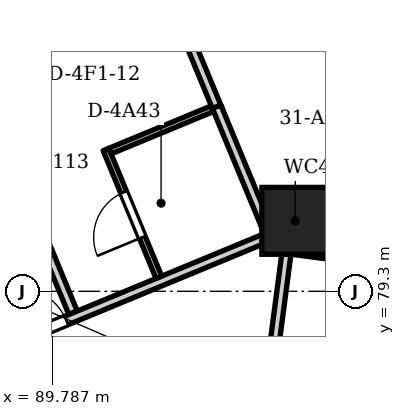
"""IFC4 building model, lengths in metres.
Left out: names, types, materials, properties, quantities, classifications, styles, units other than length and angle.
Written with IfcOpenShell. Run it as: python <this file> out.ifc"""

import sys

from ifc_helpers import new_model, si_unit, direction, frame, frame_2d, origin, origin_2d, place, context, subcontext, project, spatial, polyline, rectangle, circle, outline, extrude, element, fill, save


model = new_model("IFC4")
c1 = context("Model", 3, precision=1e-05, world=origin(), true_north=direction((0.0, 1.0)))
c2 = subcontext(c1, "Body", "Model", "MODEL_VIEW")
j1 = project(units=[si_unit("LENGTHUNIT", "METRE"), si_unit("PLANEANGLEUNIT", "RADIAN")], contexts=[c1])
p1 = place(None, origin())
s1 = spatial("IfcSite", under=j1, at=p1, CompositionType="ELEMENT")
p2 = place(p1, origin())
s2 = spatial("IfcBuilding", under=s1, at=p2, CompositionType="ELEMENT")
p3 = place(p2, frame((0.0, 0.0, 124.2)))
s3 = spatial("IfcBuildingStorey", under=s2, at=p3, CompositionType="ELEMENT", Elevation=124.2)
p4 = place(p3, frame((93.78, 80.459, -0.35), z_axis=(0.0, 0.0, 1.0), x_axis=(1.0, 0.0, 0.0)))
e1 = element("IfcColumn", 1, at=p4, inside=s3, PredefinedType="COLUMN", context=c2, shape_type="SweptSolid", body=[
    extrude(circle(Radius=0.55, at=origin_2d()), origin(), (0.0, 0.0, 1.0), 3.95),
])
p5 = place(p3, frame((52.387, 70.1, 0.0), z_axis=(0.0, 0.0, 1.0), x_axis=(0.92388051416, 0.382681062447, 0.0)))
e2 = element("IfcWall", 2, at=p5, inside=s3, PredefinedType="SOLIDWALL", context=c2, shape_type="SweptSolid", body=[
    extrude(outline(polyline([(0.149, 0.075), (0.149, -0.075), (45.057, -0.075), (45.057, 0.075), (0.149, 0.075)])), origin(), (0.0, 0.0, 1.0), 3.3),
])
p6 = place(p5, frame((1.239, 0.0, 0.0)))
e3 = element("IfcOpeningElement", 3, at=p6, cuts=e2, PredefinedType="OPENING", context=c2, shape_type="SweptSolid", body=[
    extrude(rectangle(XDim=1.8, YDim=2.6, at=frame_2d((0.9, 1.3))), frame((0.0, 0.085, 0.0), z_axis=(0.0, -1.0, 0.0), x_axis=(1.0, 0.0, 0.0)), (0.0, 0.0, 1.0), 0.17),
])
p7 = place(p5, frame((4.316, 0.0, 0.0)))
e4 = element("IfcOpeningElement", 4, at=p7, cuts=e2, PredefinedType="OPENING", context=c2, shape_type="SweptSolid", body=[
    extrude(rectangle(XDim=1.8, YDim=2.6, at=frame_2d((0.9, 1.3))), frame((0.0, 0.085, 0.0), z_axis=(0.0, -1.0, 0.0), x_axis=(1.0, 0.0, 0.0)), (0.0, 0.0, 1.0), 0.17),
])
p8 = place(p5, frame((7.793, 0.0, 0.0)))
e5 = element("IfcOpeningElement", 5, at=p8, cuts=e2, PredefinedType="OPENING", context=c2, shape_type="SweptSolid", body=[
    extrude(rectangle(XDim=1.8, YDim=2.6, at=frame_2d((0.9, 1.3))), frame((0.0, 0.085, 0.0), z_axis=(0.0, -1.0, 0.0), x_axis=(1.0, 0.0, 0.0)), (0.0, 0.0, 1.0), 0.17),
])
p9 = place(p5, frame((11.271, 0.0, 0.0)))
e6 = element("IfcOpeningElement", 6, at=p9, cuts=e2, PredefinedType="OPENING", context=c2, shape_type="SweptSolid", body=[
    extrude(rectangle(XDim=1.8, YDim=2.6, at=frame_2d((0.9, 1.3))), frame((0.0, 0.085, 0.0), z_axis=(0.0, -1.0, 0.0), x_axis=(1.0, 0.0, 0.0)), (0.0, 0.0, 1.0), 0.17),
])
p10 = place(p5, frame((14.748, 0.0, 0.0)))
e7 = element("IfcOpeningElement", 7, at=p10, cuts=e2, PredefinedType="OPENING", context=c2, shape_type="SweptSolid", body=[
    extrude(rectangle(XDim=1.8, YDim=2.6, at=frame_2d((0.9, 1.3))), frame((0.0, 0.085, 0.0), z_axis=(0.0, -1.0, 0.0), x_axis=(1.0, 0.0, 0.0)), (0.0, 0.0, 1.0), 0.17),
])
p11 = place(p5, frame((18.226, 0.0, 0.0)))
e8 = element("IfcOpeningElement", 8, at=p11, cuts=e2, PredefinedType="OPENING", context=c2, shape_type="SweptSolid", body=[
    extrude(rectangle(XDim=1.8, YDim=2.6, at=frame_2d((0.9, 1.3))), frame((0.0, 0.085, 0.0), z_axis=(0.0, -1.0, 0.0), x_axis=(1.0, 0.0, 0.0)), (0.0, 0.0, 1.0), 0.17),
])
p12 = place(p5, frame((21.703, 0.0, 0.0)))
e9 = element("IfcOpeningElement", 9, at=p12, cuts=e2, PredefinedType="OPENING", context=c2, shape_type="SweptSolid", body=[
    extrude(rectangle(XDim=1.8, YDim=2.6, at=frame_2d((0.9, 1.3))), frame((0.0, 0.085, 0.0), z_axis=(0.0, -1.0, 0.0), x_axis=(1.0, 0.0, 0.0)), (0.0, 0.0, 1.0), 0.17),
])
p13 = place(p5, frame((25.18, 0.0, 0.0)))
e10 = element("IfcOpeningElement", 10, at=p13, cuts=e2, PredefinedType="OPENING", context=c2, shape_type="SweptSolid", body=[
    extrude(rectangle(XDim=1.8, YDim=2.6, at=frame_2d((0.9, 1.3))), frame((0.0, 0.085, 0.0), z_axis=(0.0, -1.0, 0.0), x_axis=(1.0, 0.0, 0.0)), (0.0, 0.0, 1.0), 0.17),
])
p14 = place(p5, frame((28.658, 0.0, 0.0)))
e11 = element("IfcOpeningElement", 11, at=p14, cuts=e2, PredefinedType="OPENING", context=c2, shape_type="SweptSolid", body=[
    extrude(rectangle(XDim=1.8, YDim=2.6, at=frame_2d((0.9, 1.3))), frame((0.0, 0.085, 0.0), z_axis=(0.0, -1.0, 0.0), x_axis=(1.0, 0.0, 0.0)), (0.0, 0.0, 1.0), 0.17),
])
p15 = place(p5, frame((32.135, 0.0, 0.0)))
e12 = element("IfcOpeningElement", 12, at=p15, cuts=e2, PredefinedType="OPENING", context=c2, shape_type="SweptSolid", body=[
    extrude(rectangle(XDim=1.8, YDim=2.6, at=frame_2d((0.9, 1.3))), frame((0.0, 0.085, 0.0), z_axis=(0.0, -1.0, 0.0), x_axis=(1.0, 0.0, 0.0)), (0.0, 0.0, 1.0), 0.17),
])
p16 = place(p5, frame((35.613, 0.0, 0.0)))
e13 = element("IfcOpeningElement", 13, at=p16, cuts=e2, PredefinedType="OPENING", context=c2, shape_type="SweptSolid", body=[
    extrude(rectangle(XDim=1.8, YDim=2.6, at=frame_2d((0.9, 1.3))), frame((0.0, 0.085, 0.0), z_axis=(0.0, -1.0, 0.0), x_axis=(1.0, 0.0, 0.0)), (0.0, 0.0, 1.0), 0.17),
])
p17 = place(p5, frame((39.09, 0.0, 0.0)))
e14 = element("IfcOpeningElement", 14, at=p17, cuts=e2, PredefinedType="OPENING", context=c2, shape_type="SweptSolid", body=[
    extrude(rectangle(XDim=1.8, YDim=2.6, at=frame_2d((0.9, 1.3))), frame((0.0, 0.085, 0.0), z_axis=(0.0, -1.0, 0.0), x_axis=(1.0, 0.0, 0.0)), (0.0, 0.0, 1.0), 0.17),
])
p18 = place(p5, frame((42.167, 0.0, 0.0)))
e15 = element("IfcOpeningElement", 15, at=p18, cuts=e2, PredefinedType="OPENING", context=c2, shape_type="SweptSolid", body=[
    extrude(rectangle(XDim=1.8, YDim=2.6, at=frame_2d((0.9, 1.3))), frame((0.0, 0.085, 0.0), z_axis=(0.0, -1.0, 0.0), x_axis=(1.0, 0.0, 0.0)), (0.0, 0.0, 1.0), 0.17),
])
p19 = place(p3, frame((87.755, 84.668, 0.0), z_axis=(0.0, 0.0, 1.0), x_axis=(0.382666303598, -0.923886627293, 0.0)))
e16 = element("IfcWall", 16, at=p19, inside=s3, PredefinedType="PARTITIONING", context=c2, shape_type="SweptSolid", body=[
    extrude(rectangle(XDim=6.193, YDim=0.15, at=frame_2d((3.097, 0.0))), origin(), (0.0, 0.0, 1.0), 3.3),
])
p20 = place(p3, frame((88.693, 78.272, 0.0), z_axis=(0.0, 0.0, 1.0), x_axis=(0.92395946552, 0.382490399978, 0.0)))
e17 = element("IfcWall", 17, at=p20, inside=s3, PredefinedType="PARTITIONING", context=c2, shape_type="SweptSolid", body=[
    extrude(rectangle(XDim=5.134, YDim=0.15, at=frame_2d((2.567, 0.0))), origin(), (0.0, 0.0, 1.0), 2.8),
])
p21 = place(p20, frame((0.531, 0.0, 0.0)))
e18 = element("IfcOpeningElement", 18, at=p21, cuts=e17, PredefinedType="OPENING", context=c2, shape_type="SweptSolid", body=[
    extrude(rectangle(XDim=0.9, YDim=2.1, at=frame_2d((0.45, 1.05))), frame((0.0, 0.085, 0.0), z_axis=(0.0, -1.0, 0.0), x_axis=(1.0, 0.0, 0.0)), (0.0, 0.0, 1.0), 0.17),
])
p22 = place(p3, frame((90.666, 81.632, 0.0), z_axis=(0.0, 0.0, 1.0), x_axis=(0.382595073996, -0.923916126796, 0.0)))
e19 = element("IfcWall", 19, at=p22, inside=s3, PredefinedType="PARTITIONING", context=c2, shape_type="SweptSolid", body=[
    extrude(rectangle(XDim=2.275, YDim=0.1, at=frame_2d((1.137, 0.0))), origin(), (0.0, 0.0, 1.0), 3.3),
])
p23 = place(p22, frame((0.763, 0.0, 0.0)))
e20 = element("IfcOpeningElement", 20, at=p23, cuts=e19, PredefinedType="OPENING", context=c2, shape_type="SweptSolid", body=[
    extrude(rectangle(XDim=0.8, YDim=2.1, at=frame_2d((0.4, 1.05))), frame((0.0, 0.06, 0.0), z_axis=(0.0, -1.0, 0.0), x_axis=(1.0, 0.0, 0.0)), (0.0, 0.0, 1.0), 0.12),
])
p24 = place(p3, frame((90.731, 81.605, 0.0), z_axis=(0.0, 0.0, 1.0), x_axis=(0.923945120737, 0.382525049986, 0.0)))
e21 = element("IfcWall", 21, at=p24, inside=s3, PredefinedType="PARTITIONING", context=c2, shape_type="SweptSolid", body=[
    extrude(rectangle(XDim=1.825, YDim=0.1, at=frame_2d((0.913, 0.0))), origin(), (0.0, 0.0, 1.0), 3.3),
])
p25 = place(p3, frame((90.968, 85.999, 0.0), z_axis=(0.0, 0.0, 1.0), x_axis=(0.382692977479, -0.923875578738, 0.0)))
e22 = element("IfcWall", 22, at=p25, inside=s3, PredefinedType="PARTITIONING", context=c2, shape_type="SweptSolid", body=[
    extrude(rectangle(XDim=4.024, YDim=0.15, at=frame_2d((2.012, 0.0))), origin(), (0.0, 0.0, 1.0), 3.3),
])
p26 = place(p25, frame((0.15, 0.0, 0.0)))
e23 = element("IfcOpeningElement", 23, at=p26, cuts=e22, PredefinedType="OPENING", context=c2, shape_type="SweptSolid", body=[
    extrude(rectangle(XDim=0.9, YDim=2.1, at=frame_2d((0.45, 1.05))), frame((0.0, 0.085, 0.0), z_axis=(0.0, -1.0, 0.0), x_axis=(1.0, 0.0, 0.0)), (0.0, 0.0, 1.0), 0.17),
])
p27 = place(p3, frame((92.486, 82.336, 0.0), z_axis=(0.0, 0.0, 1.0), x_axis=(0.382374366103, -0.924007491391, 0.0)))
e24 = element("IfcWall", 24, at=p27, inside=s3, PredefinedType="PARTITIONING", context=c2, shape_type="SweptSolid", body=[
    extrude(rectangle(XDim=2.229, YDim=0.15, at=frame_2d((1.115, 0.0))), origin(), (0.0, 0.0, 1.0), 3.3),
])
p28 = place(p3, frame((92.983, 74.979, 0.0), z_axis=(0.0, 0.0, 1.0), x_axis=(0.130587368937, 0.991436805386, 0.0)))
e25 = element("IfcWall", 25, at=p28, inside=s3, PredefinedType="PARTITIONING", context=c2, shape_type="SweptSolid", body=[
    extrude(rectangle(XDim=5.134, YDim=0.15, at=frame_2d((2.567, 0.0))), origin(), (0.0, 0.0, 1.0), 2.8),
])
p29 = place(p28, frame((0.532, 0.0, 0.0)))
e26 = element("IfcOpeningElement", 26, at=p29, cuts=e25, PredefinedType="OPENING", context=c2, shape_type="SweptSolid", body=[
    extrude(rectangle(XDim=0.9, YDim=2.1, at=frame_2d((0.45, 1.05))), frame((0.0, 0.085, 0.0), z_axis=(0.0, -1.0, 0.0), x_axis=(1.0, 0.0, 0.0)), (0.0, 0.0, 1.0), 0.17),
])
p30 = place(p3, frame((93.719, 79.984, 0.0), z_axis=(0.0, 0.0, 1.0), x_axis=(0.991444602233, -0.130528160577, 0.0)))
e27 = element("IfcWall", 27, at=p30, inside=s3, PredefinedType="PARTITIONING", context=c2, shape_type="SweptSolid", body=[
    extrude(rectangle(XDim=2.229, YDim=0.15, at=frame_2d((1.115, 0.0))), origin(), (0.0, 0.0, 1.0), 3.3),
])
p31 = place(p21, origin())
e28 = element("IfcDoor", 28, at=p31, inside=s3, OperationType="SINGLE_SWING_LEFT", PredefinedType="DOOR", context=c2, shape_type="SweptSolid", body=[
    extrude(rectangle(XDim=0.9, YDim=2.1, at=frame_2d((0.45, 1.05))), frame((0.0, 0.025, 0.0), z_axis=(0.0, -1.0, 0.0), x_axis=(1.0, 0.0, 0.0)), (0.0, 0.0, 1.0), 0.05),
])
fill(e18, e28)
p32 = place(p23, frame((0.8, 0.0, 0.0), z_axis=(0.0, 0.0, 1.0), x_axis=(-1.0, 0.0, 0.0)))
e29 = element("IfcDoor", 29, at=p32, inside=s3, OperationType="SINGLE_SWING_LEFT", PredefinedType="DOOR", context=c2, shape_type="SweptSolid", body=[
    extrude(rectangle(XDim=0.8, YDim=2.1, at=frame_2d((0.4, 1.05))), frame((0.0, 0.025, 0.0), z_axis=(0.0, -1.0, 0.0), x_axis=(1.0, 0.0, 0.0)), (0.0, 0.0, 1.0), 0.05),
])
fill(e20, e29)
save(model, sys.argv[1])
